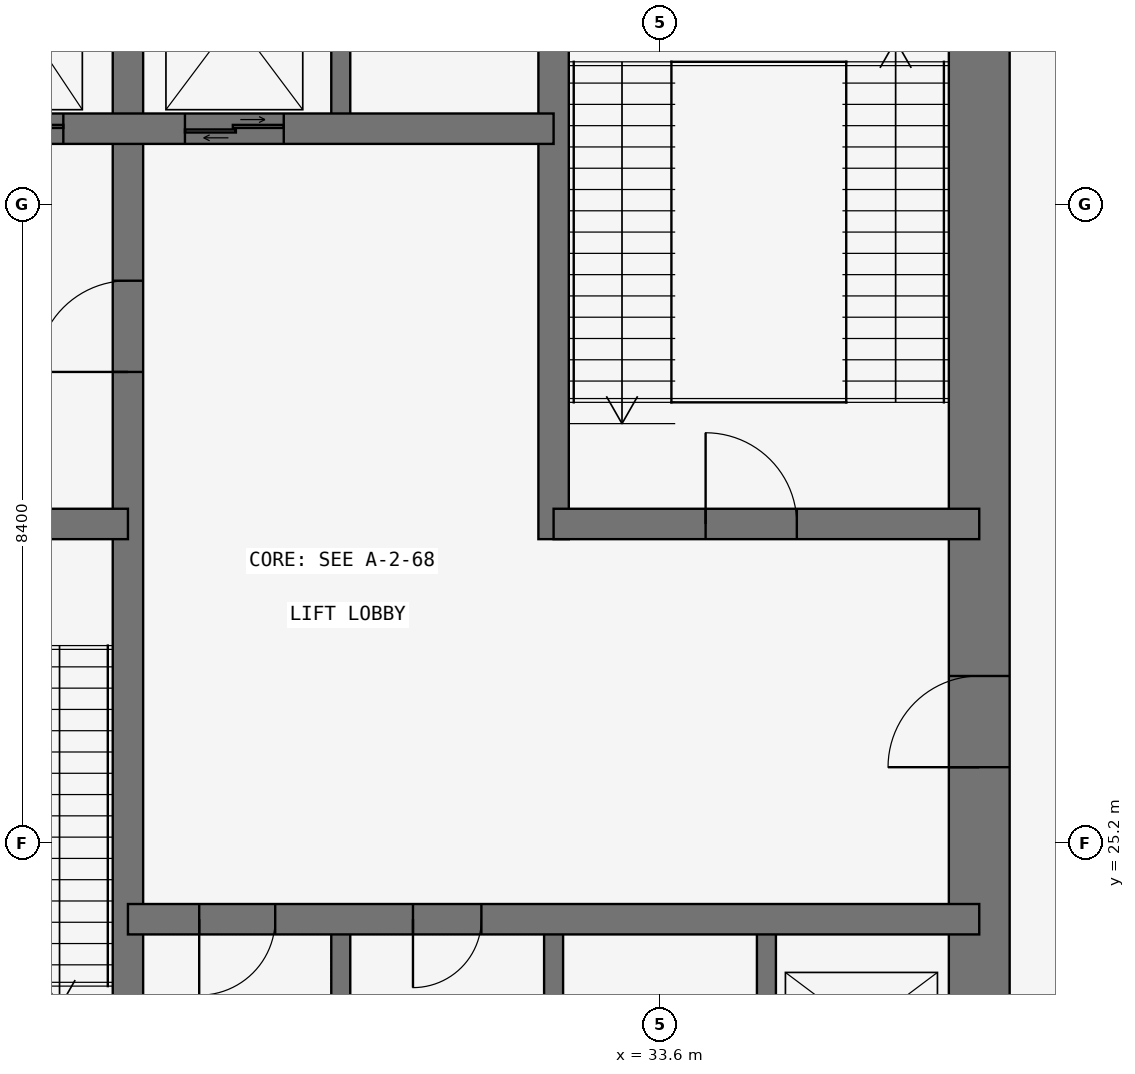
"""IFC4 building model, lengths in metres.
Left out: names, types, materials, properties, quantities, classifications, styles, units other than length and angle.
Written with IfcOpenShell. Run it as: python <this file> out.ifc"""

import sys

from ifc_helpers import new_model, si_unit, direction, frame, frame_2d, origin, place, context, subcontext, project, spatial, rectangle, extrude, element, fill, save


model = new_model("IFC4")
c1 = context("Model", 3, precision=1e-05, world=origin(), true_north=direction((0.0, 1.0)))
c2 = subcontext(c1, "Body", "Model", "MODEL_VIEW")
j1 = project(units=[si_unit("LENGTHUNIT", "METRE"), si_unit("PLANEANGLEUNIT", "RADIAN")], contexts=[c1])
p1 = place(None, origin())
s1 = spatial("IfcSite", under=j1, at=p1, CompositionType="ELEMENT")
p2 = place(p1, origin())
s2 = spatial("IfcBuilding", under=s1, at=p2, CompositionType="ELEMENT")
p3 = place(p2, frame((0.0, 0.0, 248.1)))
s3 = spatial("IfcBuildingStorey", under=s2, at=p3, CompositionType="ELEMENT", Elevation=248.1)
p4 = place(p3, frame((37.8, 21.0, 0.0), z_axis=(0.0, 0.0, 1.0), x_axis=(0.0, 1.0, 0.0)))
e1 = element("IfcWall", 1, at=p4, inside=s3, PredefinedType="SHEAR", context=c2, shape_type="SweptSolid", body=[
    extrude(rectangle(XDim=17.2, YDim=0.8, at=frame_2d((8.6, 0.0))), origin(), (0.0, 0.0, 1.0), 6.0),
])
p5 = place(p4, frame((5.2, 0.0, 0.0)))
e2 = element("IfcOpeningElement", 2, at=p5, cuts=e1, PredefinedType="OPENING", context=c2, shape_type="SweptSolid", body=[
    extrude(rectangle(XDim=1.2, YDim=2.1, at=frame_2d((0.6, 1.05))), frame((0.0, 0.41, 0.0), z_axis=(0.0, -1.0, 0.0), x_axis=(1.0, 0.0, 0.0)), (0.0, 0.0, 1.0), 0.82),
])
p6 = place(p3, frame((26.6, 21.0, 0.0), z_axis=(0.0, 0.0, 1.0), x_axis=(0.0, 1.0, 0.0)))
e3 = element("IfcWall", 3, at=p6, inside=s3, PredefinedType="SHEAR", context=c2, shape_type="SweptSolid", body=[
    extrude(rectangle(XDim=16.8, YDim=0.4, at=frame_2d((8.4, 0.0))), origin(), (0.0, 0.0, 1.0), 6.0),
])
p7 = place(p6, frame((10.4, 0.0, 0.0)))
e4 = element("IfcOpeningElement", 4, at=p7, cuts=e3, PredefinedType="OPENING", context=c2, shape_type="SweptSolid", body=[
    extrude(rectangle(XDim=1.2, YDim=2.1, at=frame_2d((0.6, 1.05))), frame((0.0, 0.21, 0.0), z_axis=(0.0, -1.0, 0.0), x_axis=(1.0, 0.0, 0.0)), (0.0, 0.0, 1.0), 0.42),
])
p8 = place(p3, frame((21.0, 29.4, 0.0), z_axis=(0.0, 0.0, 1.0), x_axis=(1.0, 0.0, 0.0)))
e5 = element("IfcWall", 5, at=p8, inside=s3, PredefinedType="SHEAR", context=c2, shape_type="SweptSolid", body=[
    extrude(rectangle(XDim=5.6, YDim=0.4, at=frame_2d((2.8, 0.0))), origin(), (0.0, 0.0, 1.0), 6.0),
])
p9 = place(p8, frame((2.3, 0.0, 0.0)))
e6 = element("IfcOpeningElement", 6, at=p9, cuts=e5, PredefinedType="OPENING", context=c2, shape_type="SweptSolid", body=[
    extrude(rectangle(XDim=1.2, YDim=2.1, at=frame_2d((0.6, 1.05))), frame((0.0, 0.21, 0.0), z_axis=(0.0, -1.0, 0.0), x_axis=(1.0, 0.0, 0.0)), (0.0, 0.0, 1.0), 0.42),
])
p10 = place(p3, frame((21.0, 34.6, 0.0), z_axis=(0.0, 0.0, 1.0), x_axis=(1.0, 0.0, 0.0)))
e7 = element("IfcWall", 7, at=p10, inside=s3, PredefinedType="SHEAR", context=c2, shape_type="SweptSolid", body=[
    extrude(rectangle(XDim=11.2, YDim=0.4, at=frame_2d((5.6, 0.0))), origin(), (0.0, 0.0, 1.0), 6.0),
])
p11 = place(p10, frame((1.0, 0.0, 0.0)))
e8 = element("IfcOpeningElement", 8, at=p11, cuts=e7, PredefinedType="OPENING", context=c2, shape_type="SweptSolid", body=[
    extrude(rectangle(XDim=1.1, YDim=2.1, at=frame_2d((0.55, 1.05))), frame((0.0, 0.21, 0.0), z_axis=(0.0, -1.0, 0.0), x_axis=(1.0, 0.0, 0.0)), (0.0, 0.0, 1.0), 0.42),
])
p12 = place(p10, frame((3.65, 0.0, 0.0)))
e9 = element("IfcOpeningElement", 9, at=p12, cuts=e7, PredefinedType="OPENING", context=c2, shape_type="SweptSolid", body=[
    extrude(rectangle(XDim=1.1, YDim=2.1, at=frame_2d((0.55, 1.05))), frame((0.0, 0.21, 0.0), z_axis=(0.0, -1.0, 0.0), x_axis=(1.0, 0.0, 0.0)), (0.0, 0.0, 1.0), 0.42),
])
p13 = place(p10, frame((6.35, 0.0, 0.0)))
e10 = element("IfcOpeningElement", 10, at=p13, cuts=e7, PredefinedType="OPENING", context=c2, shape_type="SweptSolid", body=[
    extrude(rectangle(XDim=1.3, YDim=2.1, at=frame_2d((0.65, 1.05))), frame((0.0, 0.21, 0.0), z_axis=(0.0, -1.0, 0.0), x_axis=(1.0, 0.0, 0.0)), (0.0, 0.0, 1.0), 0.42),
])
p14 = place(p3, frame((26.6, 24.2, 0.0), z_axis=(0.0, 0.0, 1.0), x_axis=(1.0, 0.0, 0.0)))
e11 = element("IfcWall", 11, at=p14, inside=s3, PredefinedType="SHEAR", context=c2, shape_type="SweptSolid", body=[
    extrude(rectangle(XDim=11.2, YDim=0.4, at=frame_2d((5.6, 0.0))), origin(), (0.0, 0.0, 1.0), 6.0),
])
p15 = place(p14, frame((0.938, 0.0, 0.0)))
e12 = element("IfcOpeningElement", 12, at=p15, cuts=e11, PredefinedType="OPENING", context=c2, shape_type="SweptSolid", body=[
    extrude(rectangle(XDim=1.0, YDim=2.1, at=frame_2d((0.5, 1.05))), frame((0.0, 0.21, 0.0), z_axis=(0.0, -1.0, 0.0), x_axis=(1.0, 0.0, 0.0)), (0.0, 0.0, 1.0), 0.42),
])
p16 = place(p14, frame((3.75, 0.0, 0.0)))
e13 = element("IfcOpeningElement", 13, at=p16, cuts=e11, PredefinedType="OPENING", context=c2, shape_type="SweptSolid", body=[
    extrude(rectangle(XDim=0.9, YDim=2.1, at=frame_2d((0.45, 1.05))), frame((0.0, 0.21, 0.0), z_axis=(0.0, -1.0, 0.0), x_axis=(1.0, 0.0, 0.0)), (0.0, 0.0, 1.0), 0.42),
])
p17 = place(p3, frame((32.2, 29.2, 0.0), z_axis=(0.0, 0.0, 1.0), x_axis=(0.0, 1.0, 0.0)))
e14 = element("IfcWall", 14, at=p17, inside=s3, PredefinedType="SHEAR", context=c2, shape_type="SweptSolid", body=[
    extrude(rectangle(XDim=8.6, YDim=0.4, at=frame_2d((4.3, 0.0))), origin(), (0.0, 0.0, 1.0), 6.0),
])
p18 = place(p3, frame((32.2, 29.4, 0.0), z_axis=(0.0, 0.0, 1.0), x_axis=(1.0, 0.0, 0.0)))
e15 = element("IfcWall", 15, at=p18, inside=s3, PredefinedType="SHEAR", context=c2, shape_type="SweptSolid", body=[
    extrude(rectangle(XDim=5.6, YDim=0.4, at=frame_2d((2.8, 0.0))), origin(), (0.0, 0.0, 1.0), 6.0),
])
p19 = place(p18, frame((2.0, 0.0, 0.0)))
e16 = element("IfcOpeningElement", 16, at=p19, cuts=e15, PredefinedType="OPENING", context=c2, shape_type="SweptSolid", body=[
    extrude(rectangle(XDim=1.2, YDim=2.1, at=frame_2d((0.6, 1.05))), frame((0.0, 0.21, 0.0), z_axis=(0.0, -1.0, 0.0), x_axis=(1.0, 0.0, 0.0)), (0.0, 0.0, 1.0), 0.42),
])
for number, where, z_axis, x_axis in (
    (17, (29.4, 21.0, 0.0), (0.0, 0.0, 1.0), (0.0, 1.0, 0.0)),
    (18, (32.2, 21.0, 0.0), (0.0, 0.0, 1.0), (0.0, 1.0, 0.0)),
    (19, (35.0, 21.0, 0.0), (0.0, 0.0, 1.0), (0.0, 1.0, 0.0)),
    (20, (29.4, 34.6, 0.0), (0.0, 0.0, 1.0), (0.0, 1.0, 0.0)),
):
    element("IfcWall", number, at=place(p3, frame(where, z_axis=z_axis, x_axis=x_axis)), inside=s3, PredefinedType="SHEAR", context=c2, shape_type="SweptSolid", body=[
        extrude(rectangle(XDim=3.2, YDim=0.25, at=frame_2d((1.6, 0.0))), origin(), (0.0, 0.0, 1.0), 6.0),
    ])
p20 = place(p7, origin())
e21 = element("IfcDoor", 21, at=p20, inside=s3, OperationType="SINGLE_SWING_LEFT", PredefinedType="DOOR", context=c2, shape_type="SweptSolid", body=[
    extrude(rectangle(XDim=1.2, YDim=2.1, at=frame_2d((0.6, 1.05))), frame((0.0, 0.025, 0.0), z_axis=(0.0, -1.0, 0.0), x_axis=(1.0, 0.0, 0.0)), (0.0, 0.0, 1.0), 0.05),
])
fill(e4, e21)
p21 = place(p5, origin())
e22 = element("IfcDoor", 22, at=p21, inside=s3, OperationType="SINGLE_SWING_LEFT", PredefinedType="DOOR", context=c2, shape_type="SweptSolid", body=[
    extrude(rectangle(XDim=1.2, YDim=2.1, at=frame_2d((0.6, 1.05))), frame((0.0, 0.025, 0.0), z_axis=(0.0, -1.0, 0.0), x_axis=(1.0, 0.0, 0.0)), (0.0, 0.0, 1.0), 0.05),
])
fill(e2, e22)
p22 = place(p19, origin())
e23 = element("IfcDoor", 23, at=p22, inside=s3, OperationType="SINGLE_SWING_LEFT", PredefinedType="DOOR", context=c2, shape_type="SweptSolid", body=[
    extrude(rectangle(XDim=1.2, YDim=2.1, at=frame_2d((0.6, 1.05))), frame((0.0, 0.025, 0.0), z_axis=(0.0, -1.0, 0.0), x_axis=(1.0, 0.0, 0.0)), (0.0, 0.0, 1.0), 0.05),
])
fill(e16, e23)
p23 = place(p15, frame((1.0, 0.0, 0.0), z_axis=(0.0, 0.0, 1.0), x_axis=(-1.0, 0.0, 0.0)))
e24 = element("IfcDoor", 24, at=p23, inside=s3, OperationType="SINGLE_SWING_RIGHT", PredefinedType="DOOR", context=c2, shape_type="SweptSolid", body=[
    extrude(rectangle(XDim=1.0, YDim=2.1, at=frame_2d((0.5, 1.05))), frame((0.0, 0.025, 0.0), z_axis=(0.0, -1.0, 0.0), x_axis=(1.0, 0.0, 0.0)), (0.0, 0.0, 1.0), 0.05),
])
fill(e12, e24)
p24 = place(p16, frame((0.9, 0.0, 0.0), z_axis=(0.0, 0.0, 1.0), x_axis=(-1.0, 0.0, 0.0)))
e25 = element("IfcDoor", 25, at=p24, inside=s3, OperationType="SINGLE_SWING_RIGHT", PredefinedType="DOOR", context=c2, shape_type="SweptSolid", body=[
    extrude(rectangle(XDim=0.9, YDim=2.1, at=frame_2d((0.45, 1.05))), frame((0.0, 0.025, 0.0), z_axis=(0.0, -1.0, 0.0), x_axis=(1.0, 0.0, 0.0)), (0.0, 0.0, 1.0), 0.05),
])
fill(e13, e25)
p25 = place(p12, origin())
e26 = element("IfcDoor", 26, at=p25, inside=s3, OperationType="DOUBLE_DOOR_SLIDING", PredefinedType="DOOR", context=c2, shape_type="SweptSolid", body=[
    extrude(rectangle(XDim=1.1, YDim=2.1, at=frame_2d((0.55, 1.05))), frame((0.0, 0.025, 0.0), z_axis=(0.0, -1.0, 0.0), x_axis=(1.0, 0.0, 0.0)), (0.0, 0.0, 1.0), 0.05),
])
fill(e9, e26)
p26 = place(p13, origin())
e27 = element("IfcDoor", 27, at=p26, inside=s3, OperationType="DOUBLE_DOOR_SLIDING", PredefinedType="DOOR", context=c2, shape_type="SweptSolid", body=[
    extrude(rectangle(XDim=1.3, YDim=2.1, at=frame_2d((0.65, 1.05))), frame((0.0, 0.025, 0.0), z_axis=(0.0, -1.0, 0.0), x_axis=(1.0, 0.0, 0.0)), (0.0, 0.0, 1.0), 0.05),
])
fill(e10, e27)
save(model, sys.argv[1])
